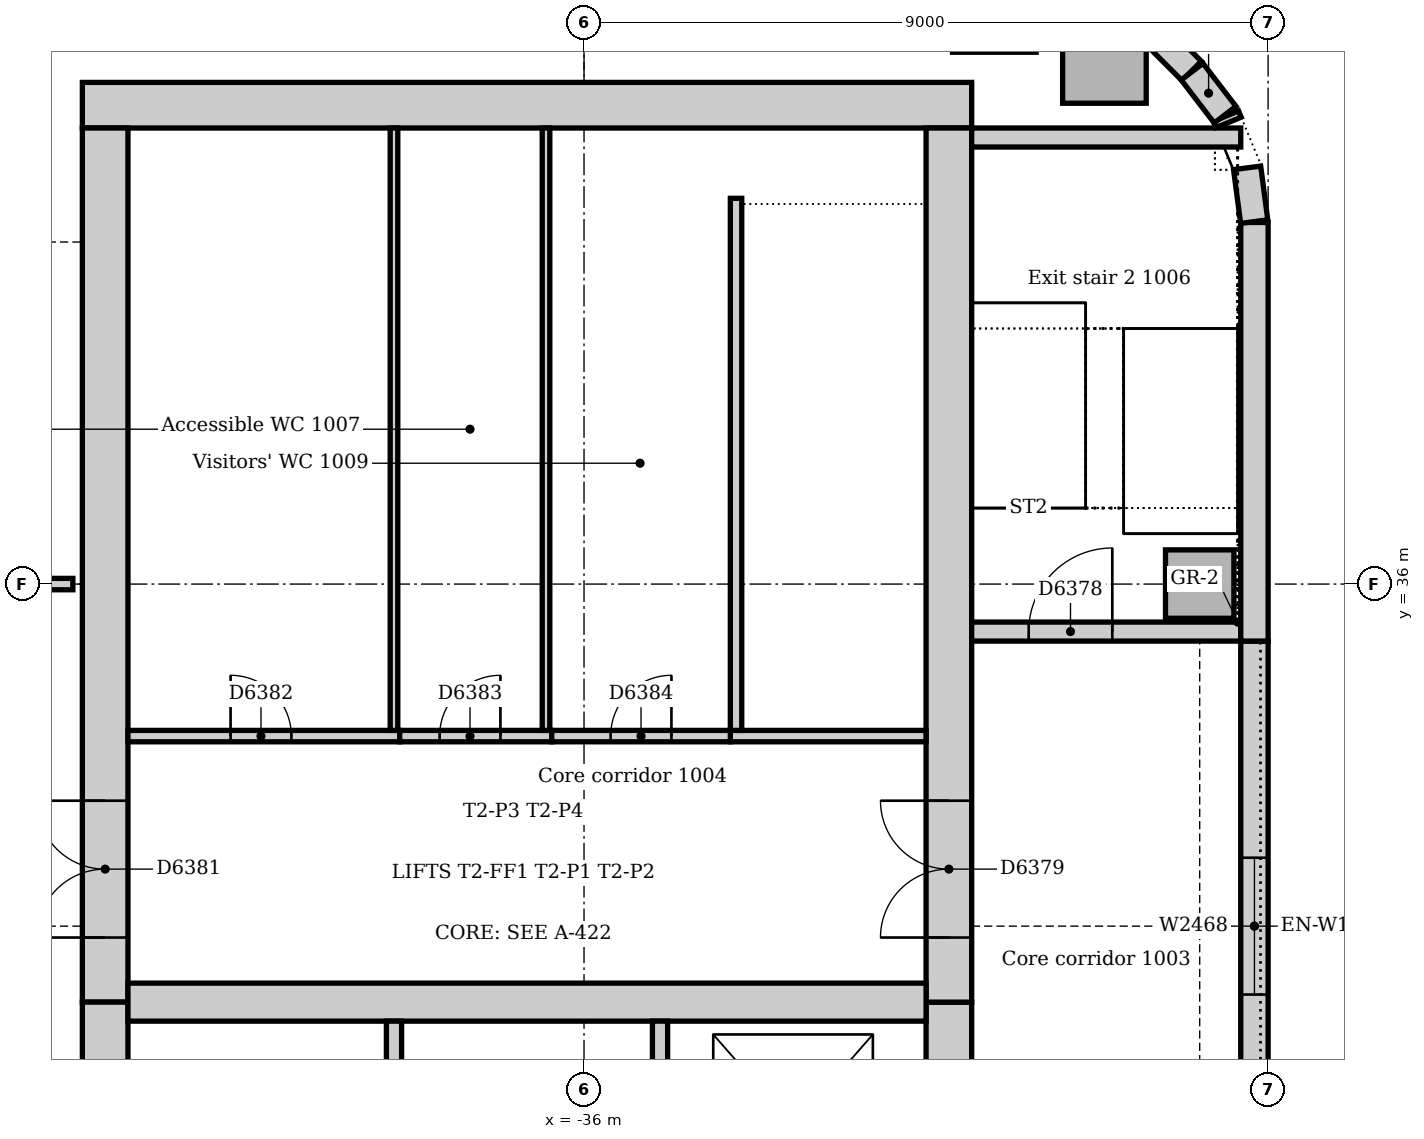
"""IFC4 building model, lengths in metres.
Left out: names, types, materials, properties, quantities, classifications, styles, units other than length and angle.
Written with IfcOpenShell. Run it as: python <this file> out.ifc"""

import sys

from ifc_helpers import new_model, si_unit, direction, frame, frame_2d, origin, origin_2d, place, context, subcontext, project, spatial, rectangle, extrude, element, fill, save


model = new_model("IFC4")
c1 = context("Model", 3, precision=1e-05, world=origin(), true_north=direction((0.0, 1.0)))
c2 = subcontext(c1, "Body", "Model", "MODEL_VIEW")
j1 = project(units=[si_unit("LENGTHUNIT", "METRE"), si_unit("PLANEANGLEUNIT", "RADIAN")], contexts=[c1])
p1 = place(None, origin())
s1 = spatial("IfcSite", under=j1, at=p1, CompositionType="ELEMENT")
p2 = place(p1, origin())
s2 = spatial("IfcBuilding", under=s1, at=p2, CompositionType="ELEMENT")
p3 = place(p2, frame((0.0, 0.0, 46.0)))
s3 = spatial("IfcBuildingStorey", under=s2, at=p3, CompositionType="ELEMENT", Elevation=46.0)
p4 = place(p3, frame((-30.9, 42.3, 0.0), z_axis=(0.0, 0.0, 1.0), x_axis=(-1.0, 0.0, 0.0)))
e1 = element("IfcWall", 1, at=p4, inside=s3, PredefinedType="SOLIDWALL", context=c2, shape_type="SweptSolid", body=[
    extrude(rectangle(XDim=11.7, YDim=0.6, at=frame_2d((5.85, 0.0))), origin(), (0.0, 0.0, 1.0), 5.0),
])
p5 = place(p3, frame((-31.2, 21.0, 0.0), z_axis=(0.0, 0.0, 1.0), x_axis=(0.0, 1.0, 0.0)))
e2 = element("IfcWall", 2, at=p5, inside=s3, PredefinedType="SOLIDWALL", context=c2, shape_type="SweptSolid", body=[
    extrude(rectangle(XDim=9.5, YDim=0.6, at=frame_2d((4.75, 0.0))), origin(), (0.0, 0.0, 1.0), 5.0),
])
p6 = place(p5, frame((5.25, 0.0, 0.0)))
e3 = element("IfcOpeningElement", 3, at=p6, cuts=e2, PredefinedType="OPENING", context=c2, shape_type="SweptSolid", body=[
    extrude(rectangle(XDim=1.0, YDim=2.1, at=frame_2d((0.5, 1.05))), frame((0.0, 0.31, 0.0), z_axis=(0.0, -1.0, 0.0), x_axis=(1.0, 0.0, 0.0)), (0.0, 0.0, 1.0), 0.62),
])
p7 = place(p3, frame((-31.2, 30.5, 0.0), z_axis=(0.0, 0.0, 1.0), x_axis=(0.0, 1.0, 0.0)))
e4 = element("IfcWall", 4, at=p7, inside=s3, PredefinedType="SOLIDWALL", context=c2, shape_type="SweptSolid", body=[
    extrude(rectangle(XDim=11.5, YDim=0.6, at=frame_2d((5.75, 0.0))), origin(), (0.0, 0.0, 1.0), 5.0),
])
p8 = place(p7, frame((0.85, 0.0, 0.0)))
e5 = element("IfcOpeningElement", 5, at=p8, cuts=e4, PredefinedType="OPENING", context=c2, shape_type="SweptSolid", body=[
    extrude(rectangle(XDim=1.8, YDim=2.1, at=frame_2d((0.9, 1.05))), frame((0.0, 0.31, 0.0), z_axis=(0.0, -1.0, 0.0), x_axis=(1.0, 0.0, 0.0)), (0.0, 0.0, 1.0), 0.62),
])
p9 = place(p3, frame((-42.3, 42.0, 0.0), z_axis=(0.0, 0.0, 1.0), x_axis=(0.0, -1.0, 0.0)))
e6 = element("IfcWall", 6, at=p9, inside=s3, PredefinedType="SOLIDWALL", context=c2, shape_type="SweptSolid", body=[
    extrude(rectangle(XDim=11.5, YDim=0.6, at=frame_2d((5.75, 0.0))), origin(), (0.0, 0.0, 1.0), 5.0),
])
p10 = place(p9, frame((8.85, 0.0, 0.0)))
e7 = element("IfcOpeningElement", 7, at=p10, cuts=e6, PredefinedType="OPENING", context=c2, shape_type="SweptSolid", body=[
    extrude(rectangle(XDim=1.8, YDim=2.1, at=frame_2d((0.9, 1.05))), frame((0.0, 0.31, 0.0), z_axis=(0.0, -1.0, 0.0), x_axis=(1.0, 0.0, 0.0)), (0.0, 0.0, 1.0), 0.62),
])
p11 = place(p3, frame((-42.3, 30.5, 0.0), z_axis=(0.0, 0.0, 1.0), x_axis=(0.0, -1.0, 0.0)))
e8 = element("IfcWall", 8, at=p11, inside=s3, PredefinedType="SOLIDWALL", context=c2, shape_type="SweptSolid", body=[
    extrude(rectangle(XDim=9.5, YDim=0.6, at=frame_2d((4.75, 0.0))), origin(), (0.0, 0.0, 1.0), 5.0),
])
p12 = place(p11, frame((3.85, 0.0, 0.0)))
e9 = element("IfcOpeningElement", 9, at=p12, cuts=e8, PredefinedType="OPENING", context=c2, shape_type="SweptSolid", body=[
    extrude(rectangle(XDim=1.8, YDim=2.1, at=frame_2d((0.9, 1.05))), frame((0.0, 0.31, 0.0), z_axis=(0.0, -1.0, 0.0), x_axis=(1.0, 0.0, 0.0)), (0.0, 0.0, 1.0), 0.62),
])
p13 = place(p3, frame((-42.0, 30.5, 0.0), z_axis=(0.0, 0.0, 1.0), x_axis=(1.0, 0.0, 0.0)))
e10 = element("IfcWall", 10, at=p13, inside=s3, PredefinedType="SOLIDWALL", context=c2, shape_type="SweptSolid", body=[
    extrude(rectangle(XDim=10.5, YDim=0.5, at=frame_2d((5.25, 0.0))), origin(), (0.0, 0.0, 1.0), 5.0),
])
p14 = place(p3, frame((-30.9, 35.375, 0.0), z_axis=(0.0, 0.0, 1.0), x_axis=(1.0, 0.0, 0.0)))
e11 = element("IfcWall", 11, at=p14, inside=s3, PredefinedType="SOLIDWALL", context=c2, shape_type="SweptSolid", body=[
    extrude(rectangle(XDim=3.54, YDim=0.25, at=frame_2d((1.77, 0.0))), origin(), (0.0, 0.0, 1.0), 5.0),
])
p15 = place(p14, frame((0.75, 0.0, 0.0)))
e12 = element("IfcOpeningElement", 12, at=p15, cuts=e11, PredefinedType="OPENING", context=c2, shape_type="SweptSolid", body=[
    extrude(rectangle(XDim=1.1, YDim=2.1, at=frame_2d((0.55, 1.05))), frame((0.0, 0.135, 0.0), z_axis=(0.0, -1.0, 0.0), x_axis=(1.0, 0.0, 0.0)), (0.0, 0.0, 1.0), 0.27),
])
p16 = place(p3, frame((-27.36, 41.875, 0.0), z_axis=(0.0, 0.0, 1.0), x_axis=(-1.0, 0.0, 0.0)))
e13 = element("IfcWall", 13, at=p16, inside=s3, PredefinedType="SOLIDWALL", context=c2, shape_type="SweptSolid", body=[
    extrude(rectangle(XDim=3.54, YDim=0.25, at=frame_2d((1.77, 0.0))), origin(), (0.0, 0.0, 1.0), 5.0),
])
p17 = place(p3, frame((-30.602, 43.547, 0.0), z_axis=(0.0, 0.0, 1.0), x_axis=(1.0, 0.0, 0.0)))
e14 = element("IfcColumn", 14, at=p17, inside=s3, PredefinedType="COLUMN", context=c2, shape_type="SweptSolid", body=[
    extrude(rectangle(XDim=1.1, YDim=1.1, at=origin_2d()), origin(), (0.0, 0.0, 1.0), 4.85),
])
p18 = place(p3, frame((-27.9, 36.0, 0.0), z_axis=(0.0, 0.0, 1.0), x_axis=(1.0, 0.0, 0.0)))
e15 = element("IfcColumn", 15, at=p18, inside=s3, PredefinedType="COLUMN", context=c2, shape_type="SweptSolid", body=[
    extrude(rectangle(XDim=0.9, YDim=0.9, at=origin_2d()), origin(), (0.0, 0.0, 1.0), 5.0),
])
p19 = place(p3, frame((-27.18, 27.75, 0.0), z_axis=(0.0, 0.0, 1.0), x_axis=(0.0, 1.0, 0.0)))
e16 = element("IfcWall", 16, at=p19, inside=s3, PredefinedType="STANDARD", context=c2, shape_type="SweptSolid", body=[
    extrude(rectangle(XDim=7.5, YDim=0.36, at=frame_2d((3.75, 0.0))), origin(), (0.0, 0.0, 1.0), 4.85),
])
p20 = place(p19, frame((2.85, 0.0, 1.2)))
e17 = element("IfcOpeningElement", 17, at=p20, cuts=e16, PredefinedType="OPENING", context=c2, shape_type="SweptSolid", body=[
    extrude(rectangle(XDim=1.8, YDim=1.2, at=frame_2d((0.9, 0.6))), frame((0.0, 0.19, 0.0), z_axis=(0.0, -1.0, 0.0), x_axis=(1.0, 0.0, 0.0)), (0.0, 0.0, 1.0), 0.38),
])
p21 = place(p3, frame((-27.18, 35.25, 0.0), z_axis=(0.0, 0.0, 1.0), x_axis=(0.0, 1.0, 0.0)))
e18 = element("IfcWall", 18, at=p21, inside=s3, PredefinedType="STANDARD", context=c2, shape_type="SweptSolid", body=[
    extrude(rectangle(XDim=5.507, YDim=0.36, at=frame_2d((2.754, 0.0))), origin(), (0.0, 0.0, 1.0), 4.85),
])
p22 = place(p3, frame((-28.006, 42.751, 0.0), z_axis=(0.0, 0.0, 1.0), x_axis=(-0.707106781187, 0.707106781187, 0.0)))
e19 = element("IfcWall", 19, at=p22, inside=s3, PredefinedType="STANDARD", context=c2, shape_type="SweptSolid", body=[
    extrude(rectangle(XDim=1.757, YDim=0.36, at=frame_2d((0.879, 0.0))), origin(), (0.0, 0.0, 1.0), 3.25),
])
p23 = place(p3, frame((-27.183, 40.769, 0.0), z_axis=(0.0, 0.0, 1.0), x_axis=(-0.13055608231, 0.99144092581, 0.0)))
e20 = element("IfcWall", 20, at=p23, inside=s3, PredefinedType="STANDARD", context=c2, shape_type="SweptSolid", body=[
    extrude(rectangle(XDim=0.713, YDim=0.36, at=frame_2d((0.356, 0.0))), origin(), (0.0, 0.0, 1.0), 3.25),
])
p24 = place(p3, frame((-27.521, 42.074, 0.0), z_axis=(0.0, 0.0, 1.0), x_axis=(-0.382549378284, 0.923935048136, 0.0)))
e21 = element("IfcWall", 21, at=p24, inside=s3, PredefinedType="STANDARD", context=c2, shape_type="SweptSolid", body=[
    extrude(rectangle(XDim=0.089, YDim=0.36, at=frame_2d((0.045, 0.0))), origin(), (0.0, 0.0, 1.0), 3.25),
])
p25 = place(p3, frame((-27.566, 42.175, 0.0), z_axis=(0.0, 0.0, 1.0), x_axis=(-0.608802368033, 0.793321924995, 0.0)))
e22 = element("IfcWall", 22, at=p25, inside=s3, PredefinedType="STANDARD", context=c2, shape_type="SweptSolid", body=[
    extrude(rectangle(XDim=0.713, YDim=0.36, at=frame_2d((0.357, 0.0))), origin(), (0.0, 0.0, 1.0), 3.25),
])
for number, where, z_axis, x_axis in (
    (23, (-38.5, 27.4, 0.0), (0.0, 0.0, 1.0), (0.0, 1.0, 0.0)),
    (24, (-35.0, 27.4, 0.0), (0.0, 0.0, 1.0), (0.0, 1.0, 0.0)),
):
    element("IfcWall", number, at=place(p3, frame(where, z_axis=z_axis, x_axis=x_axis)), inside=s3, PredefinedType="SOLIDWALL", context=c2, shape_type="SweptSolid", body=[
        extrude(rectangle(XDim=2.85, YDim=0.2, at=frame_2d((1.425, 0.0))), origin(), (0.0, 0.0, 1.0), 5.0),
    ])
p26 = place(p3, frame((-34.075, 34.0, 0.0), z_axis=(0.0, 0.0, 1.0), x_axis=(1.0, 0.0, 0.0)))
e25 = element("IfcWall", 25, at=p26, inside=s3, PredefinedType="SOLIDWALL", context=c2, shape_type="SweptSolid", body=[
    extrude(rectangle(XDim=2.575, YDim=0.15, at=frame_2d((1.288, 0.0))), origin(), (0.0, 0.0, 1.0), 5.0),
])
p27 = place(p3, frame((-34.0, 41.075, 0.0), z_axis=(0.0, 0.0, 1.0), x_axis=(0.0, -1.0, 0.0)))
e26 = element("IfcWall", 26, at=p27, inside=s3, PredefinedType="SOLIDWALL", context=c2, shape_type="SweptSolid", body=[
    extrude(rectangle(XDim=7.0, YDim=0.15, at=frame_2d((3.5, 0.0))), origin(), (0.0, 0.0, 1.0), 5.0),
])
p28 = place(p3, frame((-38.425, 34.0, 0.0), z_axis=(0.0, 0.0, 1.0), x_axis=(-1.0, 0.0, 0.0)))
e27 = element("IfcWall", 27, at=p28, inside=s3, PredefinedType="PARTITIONING", context=c2, shape_type="SweptSolid", body=[
    extrude(rectangle(XDim=3.575, YDim=0.15, at=frame_2d((1.788, 0.0))), origin(), (0.0, 0.0, 1.0), 4.85),
])
p29 = place(p28, frame((1.425, 0.0, 0.0)))
e28 = element("IfcOpeningElement", 28, at=p29, cuts=e27, PredefinedType="OPENING", context=c2, shape_type="SweptSolid", body=[
    extrude(rectangle(XDim=0.8, YDim=2.1, at=frame_2d((0.4, 1.05))), frame((0.0, 0.085, 0.0), z_axis=(0.0, -1.0, 0.0), x_axis=(1.0, 0.0, 0.0)), (0.0, 0.0, 1.0), 0.17),
])
p30 = place(p3, frame((-36.425, 34.0, 0.0), z_axis=(0.0, 0.0, 1.0), x_axis=(-1.0, 0.0, 0.0)))
e29 = element("IfcWall", 29, at=p30, inside=s3, PredefinedType="PARTITIONING", context=c2, shape_type="SweptSolid", body=[
    extrude(rectangle(XDim=2.0, YDim=0.15, at=frame_2d((1.0, 0.0))), origin(), (0.0, 0.0, 1.0), 4.85),
])
p31 = place(p30, frame((0.675, 0.0, 0.0)))
e30 = element("IfcOpeningElement", 30, at=p31, cuts=e29, PredefinedType="OPENING", context=c2, shape_type="SweptSolid", body=[
    extrude(rectangle(XDim=0.8, YDim=2.1, at=frame_2d((0.4, 1.05))), frame((0.0, 0.085, 0.0), z_axis=(0.0, -1.0, 0.0), x_axis=(1.0, 0.0, 0.0)), (0.0, 0.0, 1.0), 0.17),
])
p32 = place(p3, frame((-34.075, 34.0, 0.0), z_axis=(0.0, 0.0, 1.0), x_axis=(-1.0, 0.0, 0.0)))
e31 = element("IfcWall", 31, at=p32, inside=s3, PredefinedType="PARTITIONING", context=c2, shape_type="SweptSolid", body=[
    extrude(rectangle(XDim=2.35, YDim=0.15, at=frame_2d((1.175, 0.0))), origin(), (0.0, 0.0, 1.0), 4.85),
])
p33 = place(p32, frame((0.775, 0.0, 0.0)))
e32 = element("IfcOpeningElement", 32, at=p33, cuts=e31, PredefinedType="OPENING", context=c2, shape_type="SweptSolid", body=[
    extrude(rectangle(XDim=0.8, YDim=2.1, at=frame_2d((0.4, 1.05))), frame((0.0, 0.085, 0.0), z_axis=(0.0, -1.0, 0.0), x_axis=(1.0, 0.0, 0.0)), (0.0, 0.0, 1.0), 0.17),
])
for number, where, z_axis, x_axis in (
    (33, (-38.5, 34.075, 0.0), (0.0, 0.0, 1.0), (0.0, 1.0, 0.0)),
    (34, (-36.5, 34.075, 0.0), (0.0, 0.0, 1.0), (0.0, 1.0, 0.0)),
):
    element("IfcWall", number, at=place(p3, frame(where, z_axis=z_axis, x_axis=x_axis)), inside=s3, PredefinedType="PARTITIONING", context=c2, shape_type="SweptSolid", body=[
        extrude(rectangle(XDim=7.925, YDim=0.1, at=frame_2d((3.962, 0.0))), origin(), (0.0, 0.0, 1.0), 4.85),
    ])
p34 = place(p3, frame((-44.6, 36.0, 0.0), z_axis=(0.0, 0.0, 1.0), x_axis=(1.0, 0.0, 0.0)))
e35 = element("IfcWall", 35, at=p34, inside=s3, PredefinedType="PARTITIONING", context=c2, shape_type="SweptSolid", body=[
    extrude(rectangle(XDim=1.875, YDim=0.15, at=frame_2d((0.938, 0.0))), origin(), (0.0, 0.0, 1.0), 4.602),
])
p35 = place(p34, frame((0.45, 0.0, 0.0)))
e36 = element("IfcOpeningElement", 36, at=p35, cuts=e35, PredefinedType="OPENING", context=c2, shape_type="SweptSolid", body=[
    extrude(rectangle(XDim=1.0, YDim=2.1, at=frame_2d((0.5, 1.05))), frame((0.0, 0.085, 0.0), z_axis=(0.0, -1.0, 0.0), x_axis=(1.0, 0.0, 0.0)), (0.0, 0.0, 1.0), 0.17),
])
p36 = place(p20, origin())
e37 = element("IfcWindow", 37, at=p36, inside=s3, PartitioningType="SINGLE_PANEL", PredefinedType="WINDOW", context=c2, shape_type="SweptSolid", body=[
    extrude(rectangle(XDim=1.8, YDim=1.2, at=frame_2d((0.9, 0.6))), frame((0.0, 0.13, 0.0), z_axis=(0.0, -1.0, 0.0), x_axis=(1.0, 0.0, 0.0)), (0.0, 0.0, 1.0), 0.06),
])
fill(e17, e37)
p37 = place(p15, origin())
e38 = element("IfcDoor", 38, at=p37, inside=s3, OperationType="SINGLE_SWING_RIGHT", PredefinedType="DOOR", context=c2, shape_type="SweptSolid", body=[
    extrude(rectangle(XDim=1.1, YDim=2.1, at=frame_2d((0.55, 1.05))), frame((0.0, 0.025, 0.0), z_axis=(0.0, -1.0, 0.0), x_axis=(1.0, 0.0, 0.0)), (0.0, 0.0, 1.0), 0.05),
])
fill(e12, e38)
p38 = place(p8, origin())
e39 = element("IfcDoor", 39, at=p38, inside=s3, OperationType="DOUBLE_DOOR_SINGLE_SWING", PredefinedType="DOOR", context=c2, shape_type="SweptSolid", body=[
    extrude(rectangle(XDim=1.8, YDim=2.1, at=frame_2d((0.9, 1.05))), frame((0.0, 0.025, 0.0), z_axis=(0.0, -1.0, 0.0), x_axis=(1.0, 0.0, 0.0)), (0.0, 0.0, 1.0), 0.05),
])
fill(e5, e39)
p39 = place(p10, frame((1.8, 0.0, 0.0), z_axis=(0.0, 0.0, 1.0), x_axis=(-1.0, 0.0, 0.0)))
e40 = element("IfcDoor", 40, at=p39, inside=s3, OperationType="DOUBLE_DOOR_SINGLE_SWING", PredefinedType="DOOR", context=c2, shape_type="SweptSolid", body=[
    extrude(rectangle(XDim=1.8, YDim=2.1, at=frame_2d((0.9, 1.05))), frame((0.0, 0.025, 0.0), z_axis=(0.0, -1.0, 0.0), x_axis=(1.0, 0.0, 0.0)), (0.0, 0.0, 1.0), 0.05),
])
fill(e7, e40)
p40 = place(p29, frame((0.8, 0.0, 0.0), z_axis=(0.0, 0.0, 1.0), x_axis=(-1.0, 0.0, 0.0)))
e41 = element("IfcDoor", 41, at=p40, inside=s3, OperationType="SINGLE_SWING_LEFT", PredefinedType="DOOR", context=c2, shape_type="SweptSolid", body=[
    extrude(rectangle(XDim=0.8, YDim=2.1, at=frame_2d((0.4, 1.05))), frame((0.0, 0.025, 0.0), z_axis=(0.0, -1.0, 0.0), x_axis=(1.0, 0.0, 0.0)), (0.0, 0.0, 1.0), 0.05),
])
fill(e28, e41)
p41 = place(p31, frame((0.8, 0.0, 0.0), z_axis=(0.0, 0.0, 1.0), x_axis=(-1.0, 0.0, 0.0)))
e42 = element("IfcDoor", 42, at=p41, inside=s3, OperationType="SINGLE_SWING_RIGHT", PredefinedType="DOOR", context=c2, shape_type="SweptSolid", body=[
    extrude(rectangle(XDim=0.8, YDim=2.1, at=frame_2d((0.4, 1.05))), frame((0.0, 0.025, 0.0), z_axis=(0.0, -1.0, 0.0), x_axis=(1.0, 0.0, 0.0)), (0.0, 0.0, 1.0), 0.05),
])
fill(e30, e42)
p42 = place(p33, frame((0.8, 0.0, 0.0), z_axis=(0.0, 0.0, 1.0), x_axis=(-1.0, 0.0, 0.0)))
e43 = element("IfcDoor", 43, at=p42, inside=s3, OperationType="SINGLE_SWING_RIGHT", PredefinedType="DOOR", context=c2, shape_type="SweptSolid", body=[
    extrude(rectangle(XDim=0.8, YDim=2.1, at=frame_2d((0.4, 1.05))), frame((0.0, 0.025, 0.0), z_axis=(0.0, -1.0, 0.0), x_axis=(1.0, 0.0, 0.0)), (0.0, 0.0, 1.0), 0.05),
])
fill(e32, e43)
save(model, sys.argv[1])
